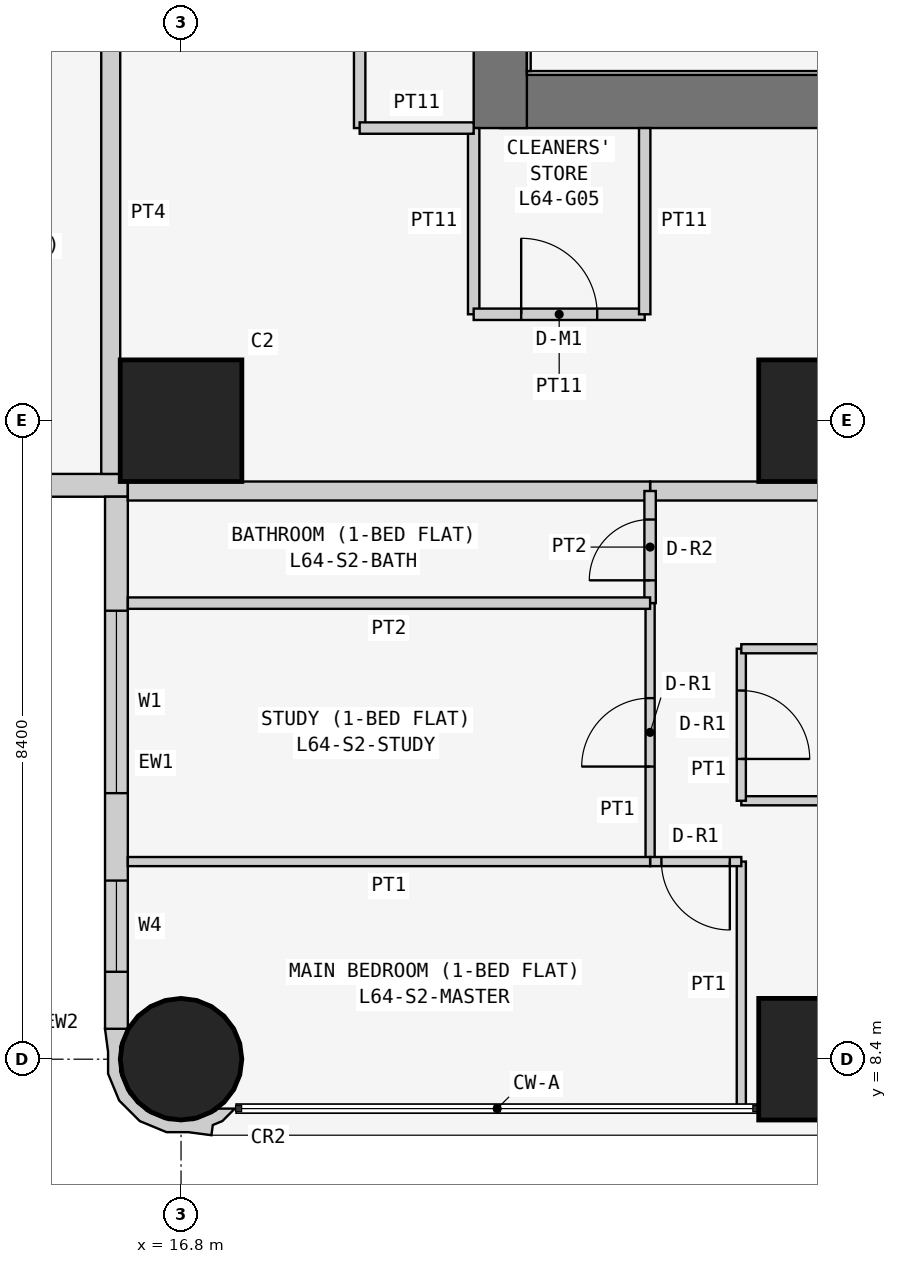
"""IFC4 building model, lengths in metres.
Left out: names, types, materials, properties, quantities, classifications, styles, units other than length and angle.
Written with IfcOpenShell. Run it as: python <this file> out.ifc"""

import sys

from ifc_helpers import new_model, si_unit, direction, frame, frame_2d, origin, origin_2d, place, context, subcontext, project, spatial, polyline, rectangle, circle, outline, extrude, element, fill, save


model = new_model("IFC4")
c1 = context("Model", 3, precision=1e-05, world=origin(), true_north=direction((0.0, 1.0)))
c2 = subcontext(c1, "Body", "Model", "MODEL_VIEW")
j1 = project(units=[si_unit("LENGTHUNIT", "METRE"), si_unit("PLANEANGLEUNIT", "RADIAN")], contexts=[c1])
p1 = place(None, origin())
s1 = spatial("IfcSite", under=j1, at=p1, CompositionType="ELEMENT")
p2 = place(p1, origin())
s2 = spatial("IfcBuilding", under=s1, at=p2, CompositionType="ELEMENT")
p3 = place(p2, frame((0.0, 0.0, 244.5)))
s3 = spatial("IfcBuildingStorey", under=s2, at=p3, CompositionType="ELEMENT", Elevation=244.5)
p4 = place(p3, frame((16.8, 8.4, 0.0), z_axis=(0.0, 0.0, 1.0), x_axis=(1.0, 0.0, 0.0)))
e1 = element("IfcColumn", 1, at=p4, inside=s3, PredefinedType="COLUMN", context=c2, shape_type="SweptSolid", body=[
    extrude(circle(Radius=0.8, at=origin_2d()), origin(), (0.0, 0.0, 1.0), 3.6),
])
for number, where, z_axis, x_axis in (
    (2, (16.8, 16.8, 0.0), (0.0, 0.0, 1.0), (1.0, 0.0, 0.0)),
    (3, (25.2, 8.4, 0.0), (0.0, 0.0, 1.0), (1.0, 0.0, 0.0)),
    (4, (25.2, 16.8, 0.0), (0.0, 0.0, 1.0), (1.0, 0.0, 0.0)),
):
    element("IfcColumn", number, at=place(p3, frame(where, z_axis=z_axis, x_axis=x_axis)), inside=s3, PredefinedType="COLUMN", context=c2, shape_type="SweptSolid", body=[
        extrude(rectangle(XDim=1.6, YDim=1.6, at=origin_2d()), origin(), (0.0, 0.0, 1.0), 3.6),
    ])
p5 = place(p3, frame((21.0, 21.0, 0.0), z_axis=(0.0, 0.0, 1.0), x_axis=(1.0, 0.0, 0.0)))
e5 = element("IfcWall", 5, at=p5, inside=s3, PredefinedType="SHEAR", context=c2, shape_type="SweptSolid", body=[
    extrude(rectangle(XDim=17.15, YDim=0.7, at=frame_2d((8.575, 0.0))), origin(), (0.0, 0.0, 1.0), 3.6),
])
p6 = place(p3, frame((21.0, 37.8, 0.0), z_axis=(0.0, 0.0, 1.0), x_axis=(0.0, -1.0, 0.0)))
e6 = element("IfcWall", 6, at=p6, inside=s3, PredefinedType="SHEAR", context=c2, shape_type="SweptSolid", body=[
    extrude(rectangle(XDim=17.15, YDim=0.7, at=frame_2d((8.575, 0.0))), origin(), (0.0, 0.0, 1.0), 3.6),
])
p7 = place(p6, frame((5.4, 0.0, 0.0)))
e7 = element("IfcOpeningElement", 7, at=p7, cuts=e6, PredefinedType="OPENING", context=c2, shape_type="SweptSolid", body=[
    extrude(rectangle(XDim=1.2, YDim=2.1, at=frame_2d((0.6, 1.05))), frame((0.0, 0.36, 0.0), z_axis=(0.0, -1.0, 0.0), x_axis=(1.0, 0.0, 0.0)), (0.0, 0.0, 1.0), 0.72),
])
p8 = place(p3, frame((0.4, 15.95, 0.0), z_axis=(0.0, 0.0, 1.0), x_axis=(1.0, 0.0, 0.0)))
e8 = element("IfcWall", 8, at=p8, inside=s3, PredefinedType="SOLIDWALL", context=c2, shape_type="SweptSolid", body=[
    extrude(rectangle(XDim=15.7, YDim=0.3, at=frame_2d((7.85, 0.0))), origin(), (0.0, 0.0, 1.0), 3.35),
])
p9 = place(p8, frame((12.4, 0.0, 0.9)))
e9 = element("IfcOpeningElement", 9, at=p9, cuts=e8, PredefinedType="OPENING", context=c2, shape_type="SweptSolid", body=[
    extrude(rectangle(XDim=1.8, YDim=1.5, at=frame_2d((0.9, 0.75))), frame((0.0, 0.16, 0.0), z_axis=(0.0, -1.0, 0.0), x_axis=(1.0, 0.0, 0.0)), (0.0, 0.0, 1.0), 0.32),
])
p10 = place(p8, frame((9.55, 0.0, 1.5)))
e10 = element("IfcOpeningElement", 10, at=p10, cuts=e8, PredefinedType="OPENING", context=c2, shape_type="SweptSolid", body=[
    extrude(rectangle(XDim=0.9, YDim=0.7, at=frame_2d((0.45, 0.35))), frame((0.0, 0.16, 0.0), z_axis=(0.0, -1.0, 0.0), x_axis=(1.0, 0.0, 0.0)), (0.0, 0.0, 1.0), 0.32),
])
p11 = place(p8, frame((5.1, 0.0, 0.9)))
e11 = element("IfcOpeningElement", 11, at=p11, cuts=e8, PredefinedType="OPENING", context=c2, shape_type="SweptSolid", body=[
    extrude(rectangle(XDim=1.8, YDim=1.5, at=frame_2d((0.9, 0.75))), frame((0.0, 0.16, 0.0), z_axis=(0.0, -1.0, 0.0), x_axis=(1.0, 0.0, 0.0)), (0.0, 0.0, 1.0), 0.32),
])
p12 = place(p8, frame((2.0, 0.0, 0.0)))
e12 = element("IfcOpeningElement", 12, at=p12, cuts=e8, PredefinedType="OPENING", context=c2, shape_type="SweptSolid", body=[
    extrude(rectangle(XDim=0.9, YDim=2.4, at=frame_2d((0.45, 1.2))), frame((0.0, 0.16, 0.0), z_axis=(0.0, -1.0, 0.0), x_axis=(1.0, 0.0, 0.0)), (0.0, 0.0, 1.0), 0.32),
])
p13 = place(p8, frame((0.7, 0.0, 0.9)))
e13 = element("IfcOpeningElement", 13, at=p13, cuts=e8, PredefinedType="OPENING", context=c2, shape_type="SweptSolid", body=[
    extrude(rectangle(XDim=1.2, YDim=1.5, at=frame_2d((0.6, 0.75))), frame((0.0, 0.16, 0.0), z_axis=(0.0, -1.0, 0.0), x_axis=(1.0, 0.0, 0.0)), (0.0, 0.0, 1.0), 0.32),
])
p14 = place(p3, frame((15.95, 15.8, 0.0), z_axis=(0.0, 0.0, 1.0), x_axis=(0.0, -1.0, 0.0)))
e14 = element("IfcWall", 14, at=p14, inside=s3, PredefinedType="SOLIDWALL", context=c2, shape_type="SweptSolid", body=[
    extrude(rectangle(XDim=7.0, YDim=0.3, at=frame_2d((3.5, 0.0))), origin(), (0.0, 0.0, 1.0), 3.35),
])
p15 = place(p14, frame((1.5, 0.0, 0.9)))
e15 = element("IfcOpeningElement", 15, at=p15, cuts=e14, PredefinedType="OPENING", context=c2, shape_type="SweptSolid", body=[
    extrude(rectangle(XDim=2.4, YDim=1.5, at=frame_2d((1.2, 0.75))), frame((0.0, 0.16, 0.0), z_axis=(0.0, -1.0, 0.0), x_axis=(1.0, 0.0, 0.0)), (0.0, 0.0, 1.0), 0.32),
])
p16 = place(p14, frame((5.05, 0.0, 0.9)))
e16 = element("IfcOpeningElement", 16, at=p16, cuts=e14, PredefinedType="OPENING", context=c2, shape_type="SweptSolid", body=[
    extrude(rectangle(XDim=1.2, YDim=1.5, at=frame_2d((0.6, 0.75))), frame((0.0, 0.16, 0.0), z_axis=(0.0, -1.0, 0.0), x_axis=(1.0, 0.0, 0.0)), (0.0, 0.0, 1.0), 0.32),
])
p17 = place(p3, frame((15.983, 8.727, 0.0), z_axis=(0.0, 0.0, 1.0), x_axis=(-0.343276641956, -0.93923434088, 0.0)))
e17 = element("IfcWall", 17, at=p17, inside=s3, PredefinedType="SOLIDWALL", context=c2, shape_type="SweptSolid", body=[
    extrude(outline(polyline([(0.829, 1.599), (0.697, 1.569), (0.604, 1.67), (0.394, 1.767), (0.471, 1.556), (0.509, 1.539), (0.724, 1.304), (0.833, 1.005), (0.82, 0.686), (0.686, 0.397), (0.451, 0.182), (0.152, 0.073), (-0.116, 0.084), (-0.127, 0.078), (-0.146, 0.071), (-0.006, -0.197), (0.266, -0.055), (0.535, 0.044), (0.817, 0.302), (0.978, 0.648), (0.994, 1.03), (0.895, 1.3), (0.829, 1.599)])), origin(), (0.0, 0.0, 1.0), 3.35),
])
p18 = place(p3, frame((20.65, 20.65, 0.0), z_axis=(0.0, 0.0, 1.0), x_axis=(0.0, -1.0, 0.0)))
e18 = element("IfcWall", 18, at=p18, inside=s3, PredefinedType="PARTITIONING", context=c2, shape_type="SweptSolid", body=[
    extrude(rectangle(XDim=2.45, YDim=0.15, at=frame_2d((1.225, 0.0))), origin(), (0.0, 0.0, 1.0), 3.35),
])
p19 = place(p3, frame((20.65, 18.2, 0.0), z_axis=(0.0, 0.0, 1.0), x_axis=(1.0, 0.0, 0.0)))
e19 = element("IfcWall", 19, at=p19, inside=s3, PredefinedType="PARTITIONING", context=c2, shape_type="SweptSolid", body=[
    extrude(rectangle(XDim=2.25, YDim=0.15, at=frame_2d((1.125, 0.0))), origin(), (0.0, 0.0, 1.0), 3.35),
])
p20 = place(p19, frame((0.625, 0.0, 0.0)))
e20 = element("IfcOpeningElement", 20, at=p20, cuts=e19, PredefinedType="OPENING", context=c2, shape_type="SweptSolid", body=[
    extrude(rectangle(XDim=1.0, YDim=2.1, at=frame_2d((0.5, 1.05))), frame((0.0, 0.085, 0.0), z_axis=(0.0, -1.0, 0.0), x_axis=(1.0, 0.0, 0.0)), (0.0, 0.0, 1.0), 0.17),
])
p21 = place(p3, frame((22.9, 18.2, 0.0), z_axis=(0.0, 0.0, 1.0), x_axis=(0.0, 1.0, 0.0)))
e21 = element("IfcWall", 21, at=p21, inside=s3, PredefinedType="PARTITIONING", context=c2, shape_type="SweptSolid", body=[
    extrude(rectangle(XDim=2.45, YDim=0.15, at=frame_2d((1.225, 0.0))), origin(), (0.0, 0.0, 1.0), 3.35),
])
p22 = place(p3, frame((19.15, 30.6, 0.0), z_axis=(0.0, 0.0, 1.0), x_axis=(0.0, -1.0, 0.0)))
e22 = element("IfcWall", 22, at=p22, inside=s3, PredefinedType="PARTITIONING", context=c2, shape_type="SweptSolid", body=[
    extrude(rectangle(XDim=9.95, YDim=0.15, at=frame_2d((4.975, 0.0))), origin(), (0.0, 0.0, 1.0), 3.35),
])
p23 = place(p22, frame((1.65, 0.0, 0.0)))
e23 = element("IfcOpeningElement", 23, at=p23, cuts=e22, PredefinedType="OPENING", context=c2, shape_type="SweptSolid", body=[
    extrude(rectangle(XDim=1.0, YDim=2.1, at=frame_2d((0.5, 1.05))), frame((0.0, 0.085, 0.0), z_axis=(0.0, -1.0, 0.0), x_axis=(1.0, 0.0, 0.0)), (0.0, 0.0, 1.0), 0.17),
])
p24 = place(p3, frame((19.15, 20.65, 0.0), z_axis=(0.0, 0.0, 1.0), x_axis=(1.0, 0.0, 0.0)))
e24 = element("IfcWall", 24, at=p24, inside=s3, PredefinedType="PARTITIONING", context=c2, shape_type="SweptSolid", body=[
    extrude(rectangle(XDim=1.5, YDim=0.15, at=frame_2d((0.75, 0.0))), origin(), (0.0, 0.0, 1.0), 3.35),
])
p25 = place(p3, frame((29.4, 15.875, 0.0), z_axis=(0.0, 0.0, 1.0), x_axis=(-1.0, 0.0, 0.0)))
e25 = element("IfcWall", 25, at=p25, inside=s3, PredefinedType="PARTITIONING", context=c2, shape_type="SweptSolid", body=[
    extrude(rectangle(XDim=6.429, YDim=0.25, at=frame_2d((3.214, 0.0))), origin(), (0.0, 0.0, 1.0), 3.35),
])
p26 = place(p25, frame((0.5, 0.0, 0.0)))
e26 = element("IfcOpeningElement", 26, at=p26, cuts=e25, PredefinedType="OPENING", context=c2, shape_type="SweptSolid", body=[
    extrude(rectangle(XDim=1.0, YDim=2.1, at=frame_2d((0.5, 1.05))), frame((0.0, 0.135, 0.0), z_axis=(0.0, -1.0, 0.0), x_axis=(1.0, 0.0, 0.0)), (0.0, 0.0, 1.0), 0.27),
])
for number, where, z_axis, x_axis in (
    (27, (22.971, 15.875, 0.0), (0.0, 0.0, 1.0), (-1.0, 0.0, 0.0)),
    (28, (15.875, 16.1, 0.0), (0.0, 0.0, 1.0), (0.0, 1.0, 0.0)),
):
    element("IfcWall", number, at=place(p3, frame(where, z_axis=z_axis, x_axis=x_axis)), inside=s3, PredefinedType="PARTITIONING", context=c2, shape_type="SweptSolid", body=[
        extrude(rectangle(XDim=6.871, YDim=0.25, at=frame_2d((3.436, 0.0))), origin(), (0.0, 0.0, 1.0), 3.35),
    ])
p27 = place(p3, frame((29.4, 11.8, 0.0), z_axis=(0.0, 0.0, 1.0), x_axis=(-1.0, 0.0, 0.0)))
e29 = element("IfcWall", 29, at=p27, inside=s3, PredefinedType="PARTITIONING", context=c2, shape_type="SweptSolid", body=[
    extrude(rectangle(XDim=5.229, YDim=0.12, at=frame_2d((2.615, 0.0))), origin(), (0.0, 0.0, 1.0), 3.35),
])
p28 = place(p3, frame((24.171, 11.8, 0.0), z_axis=(0.0, 0.0, 1.0), x_axis=(0.0, 1.0, 0.0)))
e30 = element("IfcWall", 30, at=p28, inside=s3, PredefinedType="PARTITIONING", context=c2, shape_type="SweptSolid", body=[
    extrude(rectangle(XDim=2.0, YDim=0.12, at=frame_2d((1.0, 0.0))), origin(), (0.0, 0.0, 1.0), 3.35),
])
p29 = place(p28, frame((0.55, 0.0, 0.0)))
e31 = element("IfcOpeningElement", 31, at=p29, cuts=e30, PredefinedType="OPENING", context=c2, shape_type="SweptSolid", body=[
    extrude(rectangle(XDim=0.9, YDim=2.1, at=frame_2d((0.45, 1.05))), frame((0.0, 0.07, 0.0), z_axis=(0.0, -1.0, 0.0), x_axis=(1.0, 0.0, 0.0)), (0.0, 0.0, 1.0), 0.14),
])
p30 = place(p3, frame((24.171, 13.8, 0.0), z_axis=(0.0, 0.0, 1.0), x_axis=(1.0, 0.0, 0.0)))
e32 = element("IfcWall", 32, at=p30, inside=s3, PredefinedType="PARTITIONING", context=c2, shape_type="SweptSolid", body=[
    extrude(rectangle(XDim=5.229, YDim=0.12, at=frame_2d((2.615, 0.0))), origin(), (0.0, 0.0, 1.0), 3.35),
])
p31 = place(p3, frame((22.971, 14.4, 0.0), z_axis=(0.0, 0.0, 1.0), x_axis=(0.0, 1.0, 0.0)))
e33 = element("IfcWall", 33, at=p31, inside=s3, PredefinedType="PARTITIONING", context=c2, shape_type="SweptSolid", body=[
    extrude(rectangle(XDim=1.475, YDim=0.15, at=frame_2d((0.738, 0.0))), origin(), (0.0, 0.0, 1.0), 3.35),
])
p32 = place(p31, frame((0.3, 0.0, 0.0)))
e34 = element("IfcOpeningElement", 34, at=p32, cuts=e33, PredefinedType="OPENING", context=c2, shape_type="SweptSolid", body=[
    extrude(rectangle(XDim=0.8, YDim=2.1, at=frame_2d((0.4, 1.05))), frame((0.0, 0.085, 0.0), z_axis=(0.0, -1.0, 0.0), x_axis=(1.0, 0.0, 0.0)), (0.0, 0.0, 1.0), 0.17),
])
p33 = place(p3, frame((22.971, 11.0, 0.0), z_axis=(0.0, 0.0, 1.0), x_axis=(0.0, 1.0, 0.0)))
e35 = element("IfcWall", 35, at=p33, inside=s3, PredefinedType="PARTITIONING", context=c2, shape_type="SweptSolid", body=[
    extrude(rectangle(XDim=3.4, YDim=0.12, at=frame_2d((1.7, 0.0))), origin(), (0.0, 0.0, 1.0), 3.35),
])
p34 = place(p33, frame((1.25, 0.0, 0.0)))
e36 = element("IfcOpeningElement", 36, at=p34, cuts=e35, PredefinedType="OPENING", context=c2, shape_type="SweptSolid", body=[
    extrude(rectangle(XDim=0.9, YDim=2.1, at=frame_2d((0.45, 1.05))), frame((0.0, 0.07, 0.0), z_axis=(0.0, -1.0, 0.0), x_axis=(1.0, 0.0, 0.0)), (0.0, 0.0, 1.0), 0.14),
])
p35 = place(p3, frame((24.171, 7.75, 0.0), z_axis=(0.0, 0.0, 1.0), x_axis=(0.0, 1.0, 0.0)))
e37 = element("IfcWall", 37, at=p35, inside=s3, PredefinedType="PARTITIONING", context=c2, shape_type="SweptSolid", body=[
    extrude(rectangle(XDim=3.25, YDim=0.12, at=frame_2d((1.625, 0.0))), origin(), (0.0, 0.0, 1.0), 3.35),
])
p36 = place(p3, frame((24.171, 11.0, 0.0), z_axis=(0.0, 0.0, 1.0), x_axis=(-1.0, 0.0, 0.0)))
e38 = element("IfcWall", 38, at=p36, inside=s3, PredefinedType="PARTITIONING", context=c2, shape_type="SweptSolid", body=[
    extrude(rectangle(XDim=1.2, YDim=0.12, at=frame_2d((0.6, 0.0))), origin(), (0.0, 0.0, 1.0), 3.35),
])
p37 = place(p36, frame((0.151, 0.0, 0.0)))
e39 = element("IfcOpeningElement", 39, at=p37, cuts=e38, PredefinedType="OPENING", context=c2, shape_type="SweptSolid", body=[
    extrude(rectangle(XDim=0.9, YDim=2.1, at=frame_2d((0.45, 1.05))), frame((0.0, 0.07, 0.0), z_axis=(0.0, -1.0, 0.0), x_axis=(1.0, 0.0, 0.0)), (0.0, 0.0, 1.0), 0.14),
])
p38 = place(p3, frame((22.971, 14.4, 0.0), z_axis=(0.0, 0.0, 1.0), x_axis=(-1.0, 0.0, 0.0)))
e40 = element("IfcWall", 40, at=p38, inside=s3, PredefinedType="PARTITIONING", context=c2, shape_type="SweptSolid", body=[
    extrude(rectangle(XDim=6.871, YDim=0.15, at=frame_2d((3.436, 0.0))), origin(), (0.0, 0.0, 1.0), 3.35),
])
p39 = place(p3, frame((22.971, 11.0, 0.0), z_axis=(0.0, 0.0, 1.0), x_axis=(-1.0, 0.0, 0.0)))
e41 = element("IfcWall", 41, at=p39, inside=s3, PredefinedType="PARTITIONING", context=c2, shape_type="SweptSolid", body=[
    extrude(rectangle(XDim=6.871, YDim=0.12, at=frame_2d((3.436, 0.0))), origin(), (0.0, 0.0, 1.0), 3.35),
])
p40 = place(p3, frame((21.35, 21.375, 1.8), z_axis=(0.0, 0.0, 1.0), x_axis=(1.0, 0.0, 0.0)))
e42 = element("IfcWall", 42, at=p40, inside=s3, PredefinedType="PARTITIONING", context=c2, shape_type="SweptSolid", body=[
    extrude(rectangle(XDim=5.1, YDim=0.05, at=frame_2d((2.55, 0.0))), origin(), (0.0, 0.0, 1.0), 1.8),
])
p41 = place(p3, frame((21.375, 25.33, 1.8), z_axis=(0.0, 0.0, 1.0), x_axis=(0.0, -1.0, 0.0)))
e43 = element("IfcWall", 43, at=p41, inside=s3, PredefinedType="PARTITIONING", context=c2, shape_type="SweptSolid", body=[
    extrude(rectangle(XDim=3.93, YDim=0.05, at=frame_2d((1.965, 0.0))), origin(), (0.0, 0.0, 1.0), 1.8),
])
p42 = place(p15, origin())
e44 = element("IfcWindow", 44, at=p42, inside=s3, PartitioningType="SINGLE_PANEL", PredefinedType="WINDOW", context=c2, shape_type="SweptSolid", body=[
    extrude(rectangle(XDim=2.4, YDim=1.5, at=frame_2d((1.2, 0.75))), frame((0.0, 0.03, 0.0), z_axis=(0.0, -1.0, 0.0), x_axis=(1.0, 0.0, 0.0)), (0.0, 0.0, 1.0), 0.06),
])
fill(e15, e44)
p43 = place(p16, origin())
e45 = element("IfcWindow", 45, at=p43, inside=s3, PartitioningType="SINGLE_PANEL", PredefinedType="WINDOW", context=c2, shape_type="SweptSolid", body=[
    extrude(rectangle(XDim=1.2, YDim=1.5, at=frame_2d((0.6, 0.75))), frame((0.0, 0.03, 0.0), z_axis=(0.0, -1.0, 0.0), x_axis=(1.0, 0.0, 0.0)), (0.0, 0.0, 1.0), 0.06),
])
fill(e16, e45)
p44 = place(p20, origin())
e46 = element("IfcDoor", 46, at=p44, inside=s3, OperationType="SINGLE_SWING_LEFT", PredefinedType="DOOR", context=c2, shape_type="SweptSolid", body=[
    extrude(rectangle(XDim=1.0, YDim=2.1, at=frame_2d((0.5, 1.05))), frame((0.0, 0.025, 0.0), z_axis=(0.0, -1.0, 0.0), x_axis=(1.0, 0.0, 0.0)), (0.0, 0.0, 1.0), 0.05),
])
fill(e20, e46)
p45 = place(p29, frame((0.9, 0.0, 0.0), z_axis=(0.0, 0.0, 1.0), x_axis=(-1.0, 0.0, 0.0)))
e47 = element("IfcDoor", 47, at=p45, inside=s3, OperationType="SINGLE_SWING_RIGHT", PredefinedType="DOOR", context=c2, shape_type="SweptSolid", body=[
    extrude(rectangle(XDim=0.9, YDim=2.1, at=frame_2d((0.45, 1.05))), frame((0.0, 0.025, 0.0), z_axis=(0.0, -1.0, 0.0), x_axis=(1.0, 0.0, 0.0)), (0.0, 0.0, 1.0), 0.05),
])
fill(e31, e47)
p46 = place(p32, origin())
e48 = element("IfcDoor", 48, at=p46, inside=s3, OperationType="SINGLE_SWING_LEFT", PredefinedType="DOOR", context=c2, shape_type="SweptSolid", body=[
    extrude(rectangle(XDim=0.8, YDim=2.1, at=frame_2d((0.4, 1.05))), frame((0.0, 0.025, 0.0), z_axis=(0.0, -1.0, 0.0), x_axis=(1.0, 0.0, 0.0)), (0.0, 0.0, 1.0), 0.05),
])
fill(e34, e48)
p47 = place(p34, origin())
e49 = element("IfcDoor", 49, at=p47, inside=s3, OperationType="SINGLE_SWING_LEFT", PredefinedType="DOOR", context=c2, shape_type="SweptSolid", body=[
    extrude(rectangle(XDim=0.9, YDim=2.1, at=frame_2d((0.45, 1.05))), frame((0.0, 0.025, 0.0), z_axis=(0.0, -1.0, 0.0), x_axis=(1.0, 0.0, 0.0)), (0.0, 0.0, 1.0), 0.05),
])
fill(e36, e49)
p48 = place(p37, origin())
e50 = element("IfcDoor", 50, at=p48, inside=s3, OperationType="SINGLE_SWING_LEFT", PredefinedType="DOOR", context=c2, shape_type="SweptSolid", body=[
    extrude(rectangle(XDim=0.9, YDim=2.1, at=frame_2d((0.45, 1.05))), frame((0.0, 0.025, 0.0), z_axis=(0.0, -1.0, 0.0), x_axis=(1.0, 0.0, 0.0)), (0.0, 0.0, 1.0), 0.05),
])
fill(e39, e50)
save(model, sys.argv[1])
